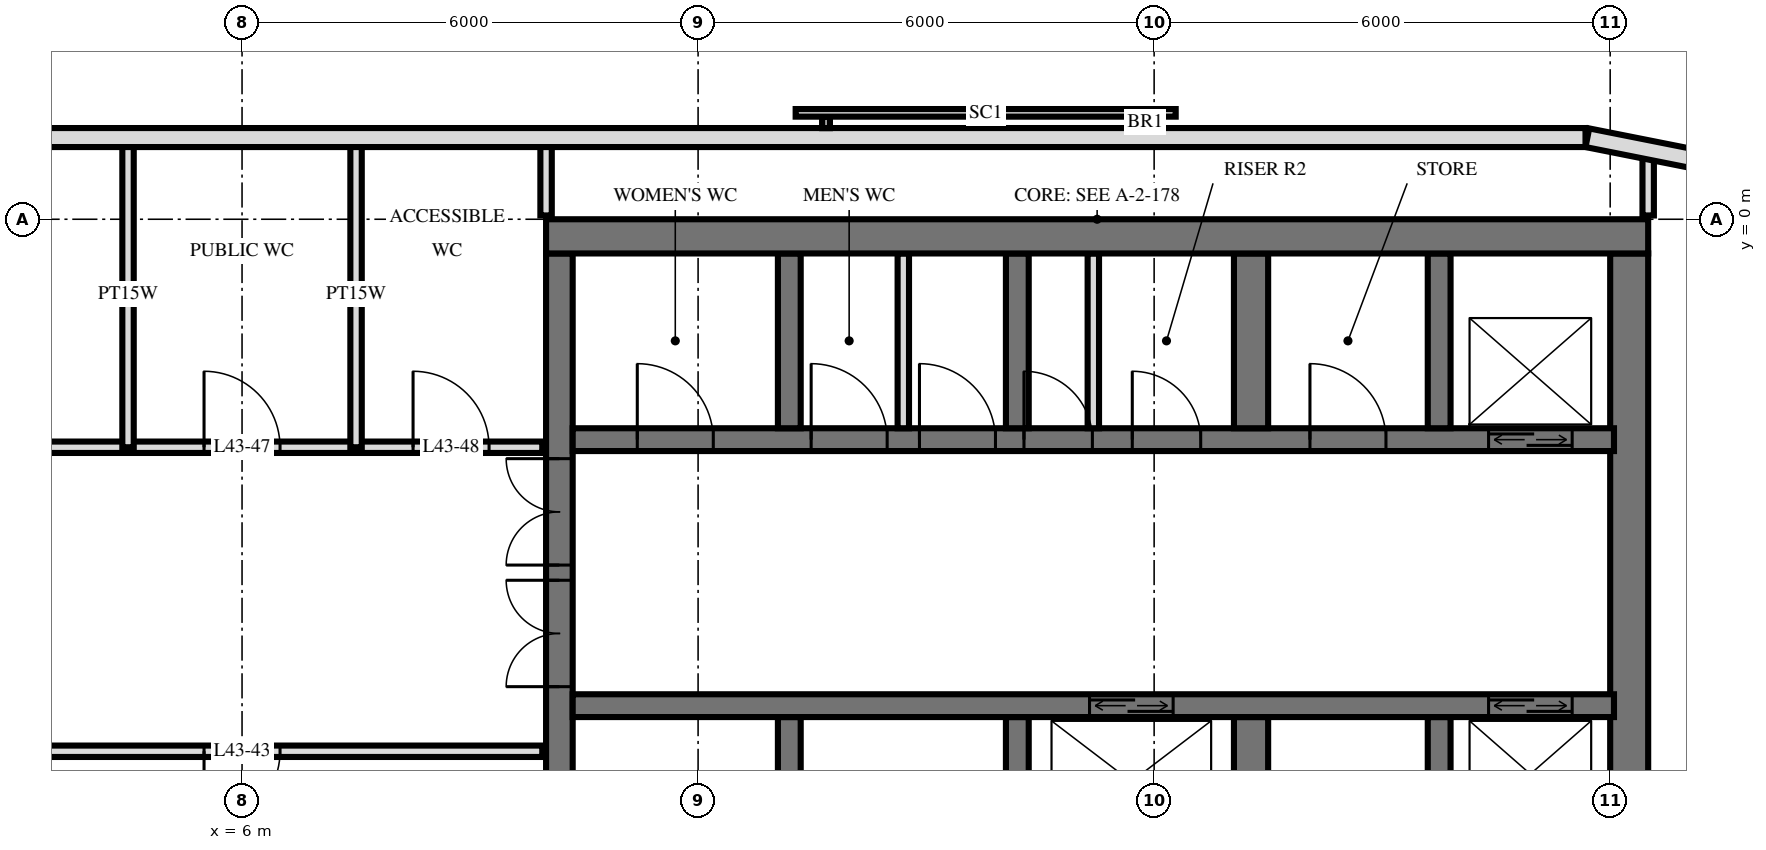
"""IFC4 building model, lengths in metres.
Left out: names, types, materials, properties, quantities, classifications, styles, units other than length and angle.
Written with IfcOpenShell. Run it as: python <this file> out.ifc"""

import sys

from ifc_helpers import new_model, si_unit, direction, frame, frame_2d, origin, place, context, subcontext, project, spatial, rectangle, extrude, element, fill, save


model = new_model("IFC4")
c1 = context("Model", 3, precision=1e-05, world=origin(), true_north=direction((0.0, 1.0)))
c2 = subcontext(c1, "Body", "Model", "MODEL_VIEW")
j1 = project(units=[si_unit("LENGTHUNIT", "METRE"), si_unit("PLANEANGLEUNIT", "RADIAN")], contexts=[c1])
p1 = place(None, origin())
s1 = spatial("IfcSite", under=j1, at=p1, CompositionType="ELEMENT")
p2 = place(p1, origin())
s2 = spatial("IfcBuilding", under=s1, at=p2, CompositionType="ELEMENT")
p3 = place(p2, frame((0.0, 0.0, 166.8)))
s3 = spatial("IfcBuildingStorey", under=s2, at=p3, CompositionType="ELEMENT", Elevation=166.8)
p4 = place(p3, frame((10.0, -0.225, 0.0), z_axis=(0.0, 0.0, 1.0), x_axis=(1.0, 0.0, 0.0)))
e1 = element("IfcWall", 1, at=p4, inside=s3, PredefinedType="SHEAR", context=c2, shape_type="SweptSolid", body=[
    extrude(rectangle(XDim=14.5, YDim=0.45, at=frame_2d((7.25, 0.0))), origin(), (0.0, 0.0, 1.0), 3.6),
])
p5 = place(p3, frame((10.175, -14.55, 0.0), z_axis=(0.0, 0.0, 1.0), x_axis=(0.0, 1.0, 0.0)))
e2 = element("IfcWall", 2, at=p5, inside=s3, PredefinedType="SHEAR", context=c2, shape_type="SweptSolid", body=[
    extrude(rectangle(XDim=14.1, YDim=0.35, at=frame_2d((7.05, 0.0))), origin(), (0.0, 0.0, 1.0), 3.6),
])
p6 = place(p5, frame((8.4, 0.0, 0.0)))
e3 = element("IfcOpeningElement", 3, at=p6, cuts=e2, PredefinedType="OPENING", context=c2, shape_type="SweptSolid", body=[
    extrude(rectangle(XDim=1.4, YDim=2.4, at=frame_2d((0.7, 1.2))), frame((0.0, 0.185, 0.0), z_axis=(0.0, -1.0, 0.0), x_axis=(1.0, 0.0, 0.0)), (0.0, 0.0, 1.0), 0.37),
])
p7 = place(p5, frame((10.0, 0.0, 0.0)))
e4 = element("IfcOpeningElement", 4, at=p7, cuts=e2, PredefinedType="OPENING", context=c2, shape_type="SweptSolid", body=[
    extrude(rectangle(XDim=1.4, YDim=2.4, at=frame_2d((0.7, 1.2))), frame((0.0, 0.185, 0.0), z_axis=(0.0, -1.0, 0.0), x_axis=(1.0, 0.0, 0.0)), (0.0, 0.0, 1.0), 0.37),
])
p8 = place(p5, frame((4.0, 0.0, 0.0)))
e5 = element("IfcOpeningElement", 5, at=p8, cuts=e2, PredefinedType="OPENING", context=c2, shape_type="SweptSolid", body=[
    extrude(rectangle(XDim=1.2, YDim=2.1, at=frame_2d((0.6, 1.05))), frame((0.0, 0.185, 0.0), z_axis=(0.0, -1.0, 0.0), x_axis=(1.0, 0.0, 0.0)), (0.0, 0.0, 1.0), 0.37),
])
p9 = place(p3, frame((24.25, -14.55, 0.0), z_axis=(0.0, 0.0, 1.0), x_axis=(0.0, 1.0, 0.0)))
e6 = element("IfcWall", 6, at=p9, inside=s3, PredefinedType="SHEAR", context=c2, shape_type="SweptSolid", body=[
    extrude(rectangle(XDim=14.1, YDim=0.5, at=frame_2d((7.05, 0.0))), origin(), (0.0, 0.0, 1.0), 3.6),
])
p10 = place(p3, frame((10.35, -2.9, 0.0), z_axis=(0.0, 0.0, 1.0), x_axis=(1.0, 0.0, 0.0)))
e7 = element("IfcWall", 7, at=p10, inside=s3, PredefinedType="SHEAR", context=c2, shape_type="SweptSolid", body=[
    extrude(rectangle(XDim=13.7, YDim=0.3, at=frame_2d((6.85, 0.0))), origin(), (0.0, 0.0, 1.0), 3.6),
])
p11 = place(p10, frame((12.05, 0.0, 0.0)))
e8 = element("IfcOpeningElement", 8, at=p11, cuts=e7, PredefinedType="OPENING", context=c2, shape_type="SweptSolid", body=[
    extrude(rectangle(XDim=1.1, YDim=2.1, at=frame_2d((0.55, 1.05))), frame((0.0, 0.16, 0.0), z_axis=(0.0, -1.0, 0.0), x_axis=(1.0, 0.0, 0.0)), (0.0, 0.0, 1.0), 0.32),
])
p12 = place(p10, frame((5.938, 0.0, 0.0)))
e9 = element("IfcOpeningElement", 9, at=p12, cuts=e7, PredefinedType="OPENING", context=c2, shape_type="SweptSolid", body=[
    extrude(rectangle(XDim=0.9, YDim=2.1, at=frame_2d((0.45, 1.05))), frame((0.0, 0.16, 0.0), z_axis=(0.0, -1.0, 0.0), x_axis=(1.0, 0.0, 0.0)), (0.0, 0.0, 1.0), 0.32),
])
p13 = place(p10, frame((7.363, 0.0, 0.0)))
e10 = element("IfcOpeningElement", 10, at=p13, cuts=e7, PredefinedType="OPENING", context=c2, shape_type="SweptSolid", body=[
    extrude(rectangle(XDim=0.9, YDim=2.1, at=frame_2d((0.45, 1.05))), frame((0.0, 0.16, 0.0), z_axis=(0.0, -1.0, 0.0), x_axis=(1.0, 0.0, 0.0)), (0.0, 0.0, 1.0), 0.32),
])
p14 = place(p10, frame((0.85, 0.0, 0.0)))
e11 = element("IfcOpeningElement", 11, at=p14, cuts=e7, PredefinedType="OPENING", context=c2, shape_type="SweptSolid", body=[
    extrude(rectangle(XDim=1.0, YDim=2.1, at=frame_2d((0.5, 1.05))), frame((0.0, 0.16, 0.0), z_axis=(0.0, -1.0, 0.0), x_axis=(1.0, 0.0, 0.0)), (0.0, 0.0, 1.0), 0.32),
])
p15 = place(p10, frame((3.137, 0.0, 0.0)))
e12 = element("IfcOpeningElement", 12, at=p15, cuts=e7, PredefinedType="OPENING", context=c2, shape_type="SweptSolid", body=[
    extrude(rectangle(XDim=1.0, YDim=2.1, at=frame_2d((0.5, 1.05))), frame((0.0, 0.16, 0.0), z_axis=(0.0, -1.0, 0.0), x_axis=(1.0, 0.0, 0.0)), (0.0, 0.0, 1.0), 0.32),
])
p16 = place(p10, frame((4.562, 0.0, 0.0)))
e13 = element("IfcOpeningElement", 13, at=p16, cuts=e7, PredefinedType="OPENING", context=c2, shape_type="SweptSolid", body=[
    extrude(rectangle(XDim=1.0, YDim=2.1, at=frame_2d((0.5, 1.05))), frame((0.0, 0.16, 0.0), z_axis=(0.0, -1.0, 0.0), x_axis=(1.0, 0.0, 0.0)), (0.0, 0.0, 1.0), 0.32),
])
p17 = place(p10, frame((9.7, 0.0, 0.0)))
e14 = element("IfcOpeningElement", 14, at=p17, cuts=e7, PredefinedType="OPENING", context=c2, shape_type="SweptSolid", body=[
    extrude(rectangle(XDim=1.0, YDim=2.1, at=frame_2d((0.5, 1.05))), frame((0.0, 0.16, 0.0), z_axis=(0.0, -1.0, 0.0), x_axis=(1.0, 0.0, 0.0)), (0.0, 0.0, 1.0), 0.32),
])
p18 = place(p3, frame((10.35, -6.4, 0.0), z_axis=(0.0, 0.0, 1.0), x_axis=(1.0, 0.0, 0.0)))
e15 = element("IfcWall", 15, at=p18, inside=s3, PredefinedType="SHEAR", context=c2, shape_type="SweptSolid", body=[
    extrude(rectangle(XDim=13.7, YDim=0.3, at=frame_2d((6.85, 0.0))), origin(), (0.0, 0.0, 1.0), 3.6),
])
p19 = place(p18, frame((12.05, 0.0, 0.0)))
e16 = element("IfcOpeningElement", 16, at=p19, cuts=e15, PredefinedType="OPENING", context=c2, shape_type="SweptSolid", body=[
    extrude(rectangle(XDim=1.1, YDim=2.1, at=frame_2d((0.55, 1.05))), frame((0.0, 0.16, 0.0), z_axis=(0.0, -1.0, 0.0), x_axis=(1.0, 0.0, 0.0)), (0.0, 0.0, 1.0), 0.32),
])
p20 = place(p18, frame((6.8, 0.0, 0.0)))
e17 = element("IfcOpeningElement", 17, at=p20, cuts=e15, PredefinedType="OPENING", context=c2, shape_type="SweptSolid", body=[
    extrude(rectangle(XDim=1.1, YDim=2.1, at=frame_2d((0.55, 1.05))), frame((0.0, 0.16, 0.0), z_axis=(0.0, -1.0, 0.0), x_axis=(1.0, 0.0, 0.0)), (0.0, 0.0, 1.0), 0.32),
])
for number, where, z_axis, x_axis in (
    (18, (13.2, -2.75, 0.0), (0.0, 0.0, 1.0), (0.0, 1.0, 0.0)),
    (19, (13.2, -8.85, 0.0), (0.0, 0.0, 1.0), (0.0, 1.0, 0.0)),
    (20, (16.2, -2.75, 0.0), (0.0, 0.0, 1.0), (0.0, 1.0, 0.0)),
    (21, (16.2, -8.85, 0.0), (0.0, 0.0, 1.0), (0.0, 1.0, 0.0)),
):
    element("IfcWall", number, at=place(p3, frame(where, z_axis=z_axis, x_axis=x_axis)), inside=s3, PredefinedType="SHEAR", context=c2, shape_type="SweptSolid", body=[
        extrude(rectangle(XDim=2.3, YDim=0.3, at=frame_2d((1.15, 0.0))), origin(), (0.0, 0.0, 1.0), 3.6),
    ])
for number, where, z_axis, x_axis in (
    (22, (19.275, -2.75, 0.0), (0.0, 0.0, 1.0), (0.0, 1.0, 0.0)),
    (23, (19.275, -8.85, 0.0), (0.0, 0.0, 1.0), (0.0, 1.0, 0.0)),
):
    element("IfcWall", number, at=place(p3, frame(where, z_axis=z_axis, x_axis=x_axis)), inside=s3, PredefinedType="SHEAR", context=c2, shape_type="SweptSolid", body=[
        extrude(rectangle(XDim=2.3, YDim=0.45, at=frame_2d((1.15, 0.0))), origin(), (0.0, 0.0, 1.0), 3.6),
    ])
for number, where, z_axis, x_axis in (
    (24, (21.75, -2.75, 0.0), (0.0, 0.0, 1.0), (0.0, 1.0, 0.0)),
    (25, (21.75, -8.85, 0.0), (0.0, 0.0, 1.0), (0.0, 1.0, 0.0)),
):
    element("IfcWall", number, at=place(p3, frame(where, z_axis=z_axis, x_axis=x_axis)), inside=s3, PredefinedType="SHEAR", context=c2, shape_type="SweptSolid", body=[
        extrude(rectangle(XDim=2.3, YDim=0.3, at=frame_2d((1.15, 0.0))), origin(), (0.0, 0.0, 1.0), 3.6),
    ])
p21 = place(p3, frame((25.349, 0.745, 0.0), z_axis=(0.0, 0.0, 1.0), x_axis=(-0.980803419081, 0.194999110559, 0.0)))
e26 = element("IfcWall", 26, at=p21, inside=s3, PredefinedType="SOLIDWALL", context=c2, shape_type="SweptSolid", body=[
    extrude(rectangle(XDim=1.681, YDim=0.25, at=frame_2d((0.841, 0.0))), origin(), (0.0, 0.0, 1.0), 3.32),
])
p22 = place(p3, frame((23.675, 1.075, 0.0), z_axis=(0.0, 0.0, 1.0), x_axis=(-1.0, 0.0, 0.0)))
e27 = element("IfcWall", 27, at=p22, inside=s3, PredefinedType="SOLIDWALL", context=c2, shape_type="SweptSolid", body=[
    extrude(rectangle(XDim=47.351, YDim=0.25, at=frame_2d((23.675, 0.0))), origin(), (0.0, 0.0, 1.0), 3.32),
])
p23 = place(p22, frame((20.225, 0.0, 0.3)))
e28 = element("IfcOpeningElement", 28, at=p23, cuts=e27, PredefinedType="OPENING", context=c2, shape_type="SweptSolid", body=[
    extrude(rectangle(XDim=2.4, YDim=2.1, at=frame_2d((1.2, 1.05))), frame((0.0, 0.135, 0.0), z_axis=(0.0, -1.0, 0.0), x_axis=(1.0, 0.0, 0.0)), (0.0, 0.0, 1.0), 0.27),
])
p24 = place(p22, frame((30.275, 0.0, 0.3)))
e29 = element("IfcOpeningElement", 29, at=p24, cuts=e27, PredefinedType="OPENING", context=c2, shape_type="SweptSolid", body=[
    extrude(rectangle(XDim=2.4, YDim=2.1, at=frame_2d((1.2, 1.05))), frame((0.0, 0.135, 0.0), z_axis=(0.0, -1.0, 0.0), x_axis=(1.0, 0.0, 0.0)), (0.0, 0.0, 1.0), 0.27),
])
for number, where, z_axis, x_axis in (
    (30, (17.2, -2.75, 0.0), (0.0, 0.0, 1.0), (0.0, 1.0, 0.0)),
    (31, (14.7, -2.75, 0.0), (0.0, 0.0, 1.0), (0.0, 1.0, 0.0)),
):
    element("IfcWall", number, at=place(p3, frame(where, z_axis=z_axis, x_axis=x_axis)), inside=s3, PredefinedType="PARTITIONING", context=c2, shape_type="SweptSolid", body=[
        extrude(rectangle(XDim=2.3, YDim=0.15, at=frame_2d((1.15, 0.0))), origin(), (0.0, 0.0, 1.0), 3.3),
    ])
p25 = place(p3, frame((24.5, 0.05, 0.0), z_axis=(0.0, 0.0, 1.0), x_axis=(0.0, 1.0, 0.0)))
e32 = element("IfcWall", 32, at=p25, inside=s3, PredefinedType="PARTITIONING", context=c2, shape_type="SweptSolid", body=[
    extrude(rectangle(XDim=0.807, YDim=0.15, at=frame_2d((0.404, 0.0))), origin(), (0.0, 0.0, 1.0), 3.32),
])
p26 = place(p3, frame((10.0, 0.05, 0.0), z_axis=(0.0, 0.0, 1.0), x_axis=(0.0, 1.0, 0.0)))
e33 = element("IfcWall", 33, at=p26, inside=s3, PredefinedType="PLUMBINGWALL", context=c2, shape_type="SweptSolid", body=[
    extrude(rectangle(XDim=0.97, YDim=0.15, at=frame_2d((0.485, 0.0))), origin(), (0.0, 0.0, 1.0), 3.32),
])
for number, where, z_axis, x_axis in (
    (34, (7.5, -3.0, 0.0), (0.0, 0.0, 1.0), (0.0, 1.0, 0.0)),
    (35, (4.5, -3.0, 0.0), (0.0, 0.0, 1.0), (0.0, 1.0, 0.0)),
):
    element("IfcWall", number, at=place(p3, frame(where, z_axis=z_axis, x_axis=x_axis)), inside=s3, PredefinedType="PLUMBINGWALL", context=c2, shape_type="SweptSolid", body=[
        extrude(rectangle(XDim=4.02, YDim=0.15, at=frame_2d((2.01, 0.0))), origin(), (0.0, 0.0, 1.0), 3.32),
    ])
p27 = place(p3, frame((-9.95, -7.0, 0.0), z_axis=(0.0, 0.0, 1.0), x_axis=(1.0, 0.0, 0.0)))
e36 = element("IfcWall", 36, at=p27, inside=s3, PredefinedType="PARTITIONING", context=c2, shape_type="SweptSolid", body=[
    extrude(rectangle(XDim=19.9, YDim=0.15, at=frame_2d((9.95, 0.0))), origin(), (0.0, 0.0, 1.0), 3.32),
])
p28 = place(p27, frame((9.45, 0.0, 0.0)))
e37 = element("IfcOpeningElement", 37, at=p28, cuts=e36, PredefinedType="OPENING", context=c2, shape_type="SweptSolid", body=[
    extrude(rectangle(XDim=1.0, YDim=2.1, at=frame_2d((0.5, 1.05))), frame((0.0, 0.085, 0.0), z_axis=(0.0, -1.0, 0.0), x_axis=(1.0, 0.0, 0.0)), (0.0, 0.0, 1.0), 0.17),
])
p29 = place(p27, frame((15.45, 0.0, 0.0)))
e38 = element("IfcOpeningElement", 38, at=p29, cuts=e36, PredefinedType="OPENING", context=c2, shape_type="SweptSolid", body=[
    extrude(rectangle(XDim=1.0, YDim=2.1, at=frame_2d((0.5, 1.05))), frame((0.0, 0.085, 0.0), z_axis=(0.0, -1.0, 0.0), x_axis=(1.0, 0.0, 0.0)), (0.0, 0.0, 1.0), 0.17),
])
p30 = place(p3, frame((-9.95, -3.0, 0.0), z_axis=(0.0, 0.0, 1.0), x_axis=(1.0, 0.0, 0.0)))
e39 = element("IfcWall", 39, at=p30, inside=s3, PredefinedType="PARTITIONING", context=c2, shape_type="SweptSolid", body=[
    extrude(rectangle(XDim=19.9, YDim=0.15, at=frame_2d((9.95, 0.0))), origin(), (0.0, 0.0, 1.0), 3.32),
])
p31 = place(p30, frame((2.2, 0.0, 0.0)))
e40 = element("IfcOpeningElement", 40, at=p31, cuts=e39, PredefinedType="OPENING", context=c2, shape_type="SweptSolid", body=[
    extrude(rectangle(XDim=1.0, YDim=2.1, at=frame_2d((0.5, 1.05))), frame((0.0, 0.085, 0.0), z_axis=(0.0, -1.0, 0.0), x_axis=(1.0, 0.0, 0.0)), (0.0, 0.0, 1.0), 0.17),
])
p32 = place(p30, frame((7.2, 0.0, 0.0)))
e41 = element("IfcOpeningElement", 41, at=p32, cuts=e39, PredefinedType="OPENING", context=c2, shape_type="SweptSolid", body=[
    extrude(rectangle(XDim=1.0, YDim=2.1, at=frame_2d((0.5, 1.05))), frame((0.0, 0.085, 0.0), z_axis=(0.0, -1.0, 0.0), x_axis=(1.0, 0.0, 0.0)), (0.0, 0.0, 1.0), 0.17),
])
p33 = place(p30, frame((11.7, 0.0, 0.0)))
e42 = element("IfcOpeningElement", 42, at=p33, cuts=e39, PredefinedType="OPENING", context=c2, shape_type="SweptSolid", body=[
    extrude(rectangle(XDim=1.0, YDim=2.1, at=frame_2d((0.5, 1.05))), frame((0.0, 0.085, 0.0), z_axis=(0.0, -1.0, 0.0), x_axis=(1.0, 0.0, 0.0)), (0.0, 0.0, 1.0), 0.17),
])
p34 = place(p30, frame((15.45, 0.0, 0.0)))
e43 = element("IfcOpeningElement", 43, at=p34, cuts=e39, PredefinedType="OPENING", context=c2, shape_type="SweptSolid", body=[
    extrude(rectangle(XDim=1.0, YDim=2.1, at=frame_2d((0.5, 1.05))), frame((0.0, 0.085, 0.0), z_axis=(0.0, -1.0, 0.0), x_axis=(1.0, 0.0, 0.0)), (0.0, 0.0, 1.0), 0.17),
])
p35 = place(p30, frame((18.2, 0.0, 0.0)))
e44 = element("IfcOpeningElement", 44, at=p35, cuts=e39, PredefinedType="OPENING", context=c2, shape_type="SweptSolid", body=[
    extrude(rectangle(XDim=1.0, YDim=2.1, at=frame_2d((0.5, 1.05))), frame((0.0, 0.085, 0.0), z_axis=(0.0, -1.0, 0.0), x_axis=(1.0, 0.0, 0.0)), (0.0, 0.0, 1.0), 0.17),
])
p36 = place(p11, origin())
e45 = element("IfcDoor", 45, at=p36, inside=s3, OperationType="DOUBLE_DOOR_SLIDING", PredefinedType="USERDEFINED", context=c2, shape_type="SweptSolid", body=[
    extrude(rectangle(XDim=1.1, YDim=2.1, at=frame_2d((0.55, 1.05))), frame((0.0, 0.025, 0.0), z_axis=(0.0, -1.0, 0.0), x_axis=(1.0, 0.0, 0.0)), (0.0, 0.0, 1.0), 0.05),
])
fill(e8, e45)
p37 = place(p19, origin())
e46 = element("IfcDoor", 46, at=p37, inside=s3, OperationType="DOUBLE_DOOR_SLIDING", PredefinedType="USERDEFINED", context=c2, shape_type="SweptSolid", body=[
    extrude(rectangle(XDim=1.1, YDim=2.1, at=frame_2d((0.55, 1.05))), frame((0.0, 0.025, 0.0), z_axis=(0.0, -1.0, 0.0), x_axis=(1.0, 0.0, 0.0)), (0.0, 0.0, 1.0), 0.05),
])
fill(e16, e46)
p38 = place(p20, origin())
e47 = element("IfcDoor", 47, at=p38, inside=s3, OperationType="DOUBLE_DOOR_SLIDING", PredefinedType="USERDEFINED", context=c2, shape_type="SweptSolid", body=[
    extrude(rectangle(XDim=1.1, YDim=2.1, at=frame_2d((0.55, 1.05))), frame((0.0, 0.025, 0.0), z_axis=(0.0, -1.0, 0.0), x_axis=(1.0, 0.0, 0.0)), (0.0, 0.0, 1.0), 0.05),
])
fill(e17, e47)
p39 = place(p6, origin())
e48 = element("IfcDoor", 48, at=p39, inside=s3, OperationType="DOUBLE_DOOR_SINGLE_SWING", PredefinedType="DOOR", context=c2, shape_type="SweptSolid", body=[
    extrude(rectangle(XDim=1.4, YDim=2.4, at=frame_2d((0.7, 1.2))), frame((0.0, 0.025, 0.0), z_axis=(0.0, -1.0, 0.0), x_axis=(1.0, 0.0, 0.0)), (0.0, 0.0, 1.0), 0.05),
])
fill(e3, e48)
p40 = place(p7, origin())
e49 = element("IfcDoor", 49, at=p40, inside=s3, OperationType="DOUBLE_DOOR_SINGLE_SWING", PredefinedType="DOOR", context=c2, shape_type="SweptSolid", body=[
    extrude(rectangle(XDim=1.4, YDim=2.4, at=frame_2d((0.7, 1.2))), frame((0.0, 0.025, 0.0), z_axis=(0.0, -1.0, 0.0), x_axis=(1.0, 0.0, 0.0)), (0.0, 0.0, 1.0), 0.05),
])
fill(e4, e49)
p41 = place(p12, origin())
e50 = element("IfcDoor", 50, at=p41, inside=s3, OperationType="SINGLE_SWING_RIGHT", PredefinedType="DOOR", context=c2, shape_type="SweptSolid", body=[
    extrude(rectangle(XDim=0.9, YDim=2.1, at=frame_2d((0.45, 1.05))), frame((0.0, 0.025, 0.0), z_axis=(0.0, -1.0, 0.0), x_axis=(1.0, 0.0, 0.0)), (0.0, 0.0, 1.0), 0.05),
])
fill(e9, e50)
p42 = place(p13, origin())
e51 = element("IfcDoor", 51, at=p42, inside=s3, OperationType="SINGLE_SWING_RIGHT", PredefinedType="DOOR", context=c2, shape_type="SweptSolid", body=[
    extrude(rectangle(XDim=0.9, YDim=2.1, at=frame_2d((0.45, 1.05))), frame((0.0, 0.025, 0.0), z_axis=(0.0, -1.0, 0.0), x_axis=(1.0, 0.0, 0.0)), (0.0, 0.0, 1.0), 0.05),
])
fill(e10, e51)
p43 = place(p14, origin())
e52 = element("IfcDoor", 52, at=p43, inside=s3, OperationType="SINGLE_SWING_RIGHT", PredefinedType="DOOR", context=c2, shape_type="SweptSolid", body=[
    extrude(rectangle(XDim=1.0, YDim=2.1, at=frame_2d((0.5, 1.05))), frame((0.0, 0.025, 0.0), z_axis=(0.0, -1.0, 0.0), x_axis=(1.0, 0.0, 0.0)), (0.0, 0.0, 1.0), 0.05),
])
fill(e11, e52)
p44 = place(p15, origin())
e53 = element("IfcDoor", 53, at=p44, inside=s3, OperationType="SINGLE_SWING_RIGHT", PredefinedType="DOOR", context=c2, shape_type="SweptSolid", body=[
    extrude(rectangle(XDim=1.0, YDim=2.1, at=frame_2d((0.5, 1.05))), frame((0.0, 0.025, 0.0), z_axis=(0.0, -1.0, 0.0), x_axis=(1.0, 0.0, 0.0)), (0.0, 0.0, 1.0), 0.05),
])
fill(e12, e53)
p45 = place(p16, origin())
e54 = element("IfcDoor", 54, at=p45, inside=s3, OperationType="SINGLE_SWING_RIGHT", PredefinedType="DOOR", context=c2, shape_type="SweptSolid", body=[
    extrude(rectangle(XDim=1.0, YDim=2.1, at=frame_2d((0.5, 1.05))), frame((0.0, 0.025, 0.0), z_axis=(0.0, -1.0, 0.0), x_axis=(1.0, 0.0, 0.0)), (0.0, 0.0, 1.0), 0.05),
])
fill(e13, e54)
p46 = place(p17, origin())
e55 = element("IfcDoor", 55, at=p46, inside=s3, OperationType="SINGLE_SWING_RIGHT", PredefinedType="DOOR", context=c2, shape_type="SweptSolid", body=[
    extrude(rectangle(XDim=1.0, YDim=2.1, at=frame_2d((0.5, 1.05))), frame((0.0, 0.025, 0.0), z_axis=(0.0, -1.0, 0.0), x_axis=(1.0, 0.0, 0.0)), (0.0, 0.0, 1.0), 0.05),
])
fill(e14, e55)
p47 = place(p29, frame((0.5, 0.0, 0.0), z_axis=(0.0, 0.0, 1.0), x_axis=(-1.0, 0.0, 0.0)))
e56 = element("IfcDoor", 56, at=p47, inside=s3, OperationType="SINGLE_SWING_LEFT", PredefinedType="DOOR", context=c2, shape_type="SweptSolid", body=[
    extrude(rectangle(XDim=1.0, YDim=2.1, at=frame_2d((0.0, 1.05))), frame((0.0, -0.025, 0.0), z_axis=(0.0, 1.0, 0.0), x_axis=(-1.0, 0.0, 0.0)), (0.0, 0.0, 1.0), 0.05),
])
fill(e38, e56)
p48 = place(p34, origin())
e57 = element("IfcDoor", 57, at=p48, inside=s3, OperationType="SINGLE_SWING_RIGHT", PredefinedType="DOOR", context=c2, shape_type="SweptSolid", body=[
    extrude(rectangle(XDim=1.0, YDim=2.1, at=frame_2d((0.5, 1.05))), frame((0.0, 0.025, 0.0), z_axis=(0.0, -1.0, 0.0), x_axis=(1.0, 0.0, 0.0)), (0.0, 0.0, 1.0), 0.05),
])
fill(e43, e57)
p49 = place(p35, origin())
e58 = element("IfcDoor", 58, at=p49, inside=s3, OperationType="SINGLE_SWING_RIGHT", PredefinedType="DOOR", context=c2, shape_type="SweptSolid", body=[
    extrude(rectangle(XDim=1.0, YDim=2.1, at=frame_2d((0.5, 1.05))), frame((0.0, 0.025, 0.0), z_axis=(0.0, -1.0, 0.0), x_axis=(1.0, 0.0, 0.0)), (0.0, 0.0, 1.0), 0.05),
])
fill(e44, e58)
save(model, sys.argv[1])
